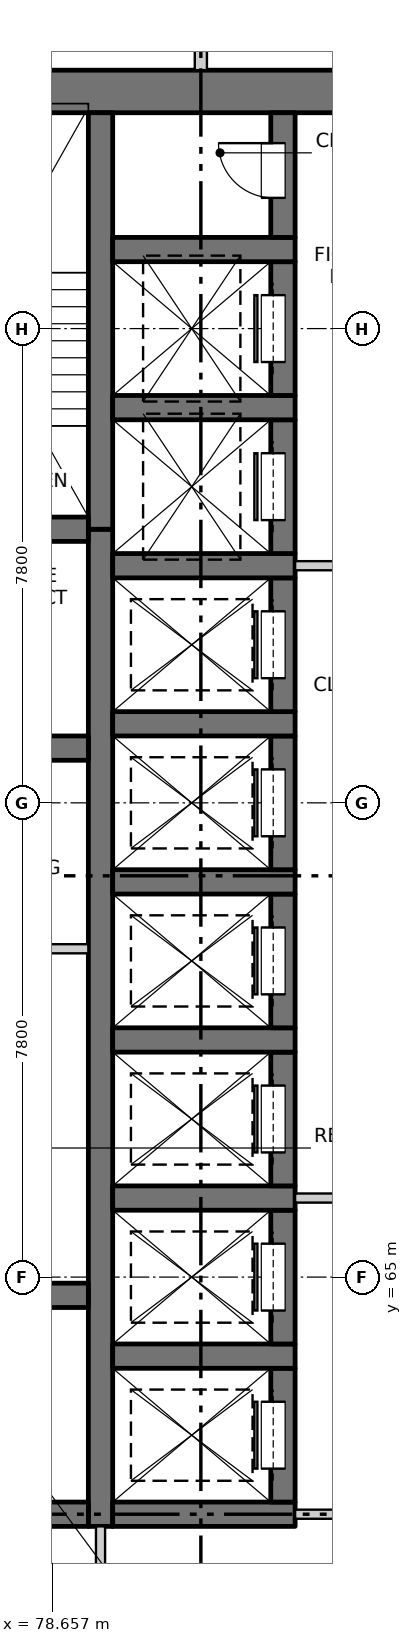
"""IFC4 building model, lengths in metres.
Left out: names, types, materials, properties, quantities, classifications, styles, units other than length and angle.
Written with IfcOpenShell. Run it as: python <this file> out.ifc"""

import sys

from ifc_helpers import new_model, si_unit, direction, frame, frame_2d, origin, place, context, subcontext, project, spatial, rectangle, extrude, element, fill, save


model = new_model("IFC4")
c1 = context("Model", 3, precision=1e-05, world=origin(), true_north=direction((0.0, 1.0)))
c2 = subcontext(c1, "Body", "Model", "MODEL_VIEW")
j1 = project(units=[si_unit("LENGTHUNIT", "METRE"), si_unit("PLANEANGLEUNIT", "RADIAN")], contexts=[c1])
p1 = place(None, origin())
s1 = spatial("IfcSite", under=j1, at=p1, CompositionType="ELEMENT")
p2 = place(p1, origin())
s2 = spatial("IfcBuilding", under=s1, at=p2, CompositionType="ELEMENT")
p3 = place(p2, frame((0.0, 0.0, 39.9)))
s3 = spatial("IfcBuildingStorey", under=s2, at=p3, CompositionType="ELEMENT", Elevation=39.9)
p4 = place(p3, frame((75.6, 84.5, -0.25), z_axis=(0.0, 0.0, 1.0), x_axis=(1.0, 0.0, 0.0)))
e1 = element("IfcWall", 1, at=p4, inside=s3, PredefinedType="SOLIDWALL", context=c2, shape_type="SweptSolid", body=[
    extrude(rectangle(XDim=18.8, YDim=0.7, at=frame_2d((9.4, 0.0))), origin(), (0.0, 0.0, 1.0), 3.4),
])
p5 = place(p3, frame((79.45, 60.9, -0.25), z_axis=(0.0, 0.0, 1.0), x_axis=(0.0, 1.0, 0.0)))
e2 = element("IfcWall", 2, at=p5, inside=s3, PredefinedType="SOLIDWALL", context=c2, shape_type="SweptSolid", body=[
    extrude(rectangle(XDim=16.4, YDim=0.4, at=frame_2d((8.2, 0.0))), origin(), (0.0, 0.0, 1.0), 3.4),
])
p6 = place(p3, frame((79.45, 77.3, -0.25), z_axis=(0.0, 0.0, 1.0), x_axis=(0.0, 1.0, 0.0)))
e3 = element("IfcWall", 3, at=p6, inside=s3, PredefinedType="SOLIDWALL", context=c2, shape_type="SweptSolid", body=[
    extrude(rectangle(XDim=6.85, YDim=0.4, at=frame_2d((3.425, 0.0))), origin(), (0.0, 0.0, 1.0), 3.4),
])
p7 = place(p3, frame((79.65, 61.1, -0.25), z_axis=(0.0, 0.0, 1.0), x_axis=(1.0, 0.0, 0.0)))
e4 = element("IfcWall", 4, at=p7, inside=s3, PredefinedType="SOLIDWALL", context=c2, shape_type="SweptSolid", body=[
    extrude(rectangle(XDim=3.0, YDim=0.4, at=frame_2d((1.5, 0.0))), origin(), (0.0, 0.0, 1.0), 3.4),
])
p8 = place(p3, frame((82.45, 61.3, -0.25), z_axis=(0.0, 0.0, 1.0), x_axis=(0.0, 1.0, 0.0)))
e5 = element("IfcWall", 5, at=p8, inside=s3, PredefinedType="SOLIDWALL", context=c2, shape_type="SweptSolid", body=[
    extrude(rectangle(XDim=2.2, YDim=0.4, at=frame_2d((1.1, 0.0))), origin(), (0.0, 0.0, 1.0), 3.4),
])
p9 = place(p8, frame((0.55, 0.0, 0.25)))
e6 = element("IfcOpeningElement", 6, at=p9, cuts=e5, PredefinedType="OPENING", context=c2, shape_type="SweptSolid", body=[
    extrude(rectangle(XDim=1.1, YDim=2.1, at=frame_2d((0.55, 1.05))), frame((0.0, 0.21, 0.0), z_axis=(0.0, -1.0, 0.0), x_axis=(1.0, 0.0, 0.0)), (0.0, 0.0, 1.0), 0.42),
])
p10 = place(p3, frame((79.65, 63.7, -0.25), z_axis=(0.0, 0.0, 1.0), x_axis=(1.0, 0.0, 0.0)))
e7 = element("IfcWall", 7, at=p10, inside=s3, PredefinedType="SOLIDWALL", context=c2, shape_type="SweptSolid", body=[
    extrude(rectangle(XDim=3.0, YDim=0.4, at=frame_2d((1.5, 0.0))), origin(), (0.0, 0.0, 1.0), 3.4),
])
p11 = place(p3, frame((82.45, 63.9, -0.25), z_axis=(0.0, 0.0, 1.0), x_axis=(0.0, 1.0, 0.0)))
e8 = element("IfcWall", 8, at=p11, inside=s3, PredefinedType="SOLIDWALL", context=c2, shape_type="SweptSolid", body=[
    extrude(rectangle(XDim=2.2, YDim=0.4, at=frame_2d((1.1, 0.0))), origin(), (0.0, 0.0, 1.0), 3.4),
])
p12 = place(p11, frame((0.55, 0.0, 0.25)))
e9 = element("IfcOpeningElement", 9, at=p12, cuts=e8, PredefinedType="OPENING", context=c2, shape_type="SweptSolid", body=[
    extrude(rectangle(XDim=1.1, YDim=2.1, at=frame_2d((0.55, 1.05))), frame((0.0, 0.21, 0.0), z_axis=(0.0, -1.0, 0.0), x_axis=(1.0, 0.0, 0.0)), (0.0, 0.0, 1.0), 0.42),
])
p13 = place(p3, frame((79.65, 66.3, -0.25), z_axis=(0.0, 0.0, 1.0), x_axis=(1.0, 0.0, 0.0)))
e10 = element("IfcWall", 10, at=p13, inside=s3, PredefinedType="SOLIDWALL", context=c2, shape_type="SweptSolid", body=[
    extrude(rectangle(XDim=3.0, YDim=0.4, at=frame_2d((1.5, 0.0))), origin(), (0.0, 0.0, 1.0), 3.4),
])
p14 = place(p3, frame((82.45, 66.5, -0.25), z_axis=(0.0, 0.0, 1.0), x_axis=(0.0, 1.0, 0.0)))
e11 = element("IfcWall", 11, at=p14, inside=s3, PredefinedType="SOLIDWALL", context=c2, shape_type="SweptSolid", body=[
    extrude(rectangle(XDim=2.2, YDim=0.4, at=frame_2d((1.1, 0.0))), origin(), (0.0, 0.0, 1.0), 3.4),
])
p15 = place(p14, frame((0.55, 0.0, 0.25)))
e12 = element("IfcOpeningElement", 12, at=p15, cuts=e11, PredefinedType="OPENING", context=c2, shape_type="SweptSolid", body=[
    extrude(rectangle(XDim=1.1, YDim=2.1, at=frame_2d((0.55, 1.05))), frame((0.0, 0.21, 0.0), z_axis=(0.0, -1.0, 0.0), x_axis=(1.0, 0.0, 0.0)), (0.0, 0.0, 1.0), 0.42),
])
p16 = place(p3, frame((79.65, 68.9, -0.25), z_axis=(0.0, 0.0, 1.0), x_axis=(1.0, 0.0, 0.0)))
e13 = element("IfcWall", 13, at=p16, inside=s3, PredefinedType="SOLIDWALL", context=c2, shape_type="SweptSolid", body=[
    extrude(rectangle(XDim=3.0, YDim=0.4, at=frame_2d((1.5, 0.0))), origin(), (0.0, 0.0, 1.0), 3.4),
])
p17 = place(p3, frame((82.45, 69.1, -0.25), z_axis=(0.0, 0.0, 1.0), x_axis=(0.0, 1.0, 0.0)))
e14 = element("IfcWall", 14, at=p17, inside=s3, PredefinedType="SOLIDWALL", context=c2, shape_type="SweptSolid", body=[
    extrude(rectangle(XDim=2.2, YDim=0.4, at=frame_2d((1.1, 0.0))), origin(), (0.0, 0.0, 1.0), 3.4),
])
p18 = place(p17, frame((0.55, 0.0, 0.25)))
e15 = element("IfcOpeningElement", 15, at=p18, cuts=e14, PredefinedType="OPENING", context=c2, shape_type="SweptSolid", body=[
    extrude(rectangle(XDim=1.1, YDim=2.1, at=frame_2d((0.55, 1.05))), frame((0.0, 0.21, 0.0), z_axis=(0.0, -1.0, 0.0), x_axis=(1.0, 0.0, 0.0)), (0.0, 0.0, 1.0), 0.42),
])
p19 = place(p3, frame((79.65, 71.5, -0.25), z_axis=(0.0, 0.0, 1.0), x_axis=(1.0, 0.0, 0.0)))
e16 = element("IfcWall", 16, at=p19, inside=s3, PredefinedType="SOLIDWALL", context=c2, shape_type="SweptSolid", body=[
    extrude(rectangle(XDim=3.0, YDim=0.4, at=frame_2d((1.5, 0.0))), origin(), (0.0, 0.0, 1.0), 3.4),
])
p20 = place(p3, frame((82.45, 71.7, -0.25), z_axis=(0.0, 0.0, 1.0), x_axis=(0.0, 1.0, 0.0)))
e17 = element("IfcWall", 17, at=p20, inside=s3, PredefinedType="SOLIDWALL", context=c2, shape_type="SweptSolid", body=[
    extrude(rectangle(XDim=2.2, YDim=0.4, at=frame_2d((1.1, 0.0))), origin(), (0.0, 0.0, 1.0), 3.4),
])
p21 = place(p20, frame((0.55, 0.0, 0.25)))
e18 = element("IfcOpeningElement", 18, at=p21, cuts=e17, PredefinedType="OPENING", context=c2, shape_type="SweptSolid", body=[
    extrude(rectangle(XDim=1.1, YDim=2.1, at=frame_2d((0.55, 1.05))), frame((0.0, 0.21, 0.0), z_axis=(0.0, -1.0, 0.0), x_axis=(1.0, 0.0, 0.0)), (0.0, 0.0, 1.0), 0.42),
])
p22 = place(p3, frame((79.65, 74.1, -0.25), z_axis=(0.0, 0.0, 1.0), x_axis=(1.0, 0.0, 0.0)))
e19 = element("IfcWall", 19, at=p22, inside=s3, PredefinedType="SOLIDWALL", context=c2, shape_type="SweptSolid", body=[
    extrude(rectangle(XDim=3.0, YDim=0.4, at=frame_2d((1.5, 0.0))), origin(), (0.0, 0.0, 1.0), 3.4),
])
p23 = place(p3, frame((82.45, 74.3, -0.25), z_axis=(0.0, 0.0, 1.0), x_axis=(0.0, 1.0, 0.0)))
e20 = element("IfcWall", 20, at=p23, inside=s3, PredefinedType="SOLIDWALL", context=c2, shape_type="SweptSolid", body=[
    extrude(rectangle(XDim=2.2, YDim=0.4, at=frame_2d((1.1, 0.0))), origin(), (0.0, 0.0, 1.0), 3.4),
])
p24 = place(p23, frame((0.55, 0.0, 0.25)))
e21 = element("IfcOpeningElement", 21, at=p24, cuts=e20, PredefinedType="OPENING", context=c2, shape_type="SweptSolid", body=[
    extrude(rectangle(XDim=1.1, YDim=2.1, at=frame_2d((0.55, 1.05))), frame((0.0, 0.21, 0.0), z_axis=(0.0, -1.0, 0.0), x_axis=(1.0, 0.0, 0.0)), (0.0, 0.0, 1.0), 0.42),
])
p25 = place(p3, frame((79.65, 76.7, -0.25), z_axis=(0.0, 0.0, 1.0), x_axis=(1.0, 0.0, 0.0)))
e22 = element("IfcWall", 22, at=p25, inside=s3, PredefinedType="SOLIDWALL", context=c2, shape_type="SweptSolid", body=[
    extrude(rectangle(XDim=3.0, YDim=0.4, at=frame_2d((1.5, 0.0))), origin(), (0.0, 0.0, 1.0), 3.4),
])
p26 = place(p3, frame((82.45, 76.9, -0.25), z_axis=(0.0, 0.0, 1.0), x_axis=(0.0, 1.0, 0.0)))
e23 = element("IfcWall", 23, at=p26, inside=s3, PredefinedType="SOLIDWALL", context=c2, shape_type="SweptSolid", body=[
    extrude(rectangle(XDim=2.2, YDim=0.4, at=frame_2d((1.1, 0.0))), origin(), (0.0, 0.0, 1.0), 3.4),
])
p27 = place(p26, frame((0.55, 0.0, 0.25)))
e24 = element("IfcOpeningElement", 24, at=p27, cuts=e23, PredefinedType="OPENING", context=c2, shape_type="SweptSolid", body=[
    extrude(rectangle(XDim=1.1, YDim=2.1, at=frame_2d((0.55, 1.05))), frame((0.0, 0.21, 0.0), z_axis=(0.0, -1.0, 0.0), x_axis=(1.0, 0.0, 0.0)), (0.0, 0.0, 1.0), 0.42),
])
p28 = place(p3, frame((79.65, 79.3, -0.25), z_axis=(0.0, 0.0, 1.0), x_axis=(1.0, 0.0, 0.0)))
e25 = element("IfcWall", 25, at=p28, inside=s3, PredefinedType="SOLIDWALL", context=c2, shape_type="SweptSolid", body=[
    extrude(rectangle(XDim=3.0, YDim=0.4, at=frame_2d((1.5, 0.0))), origin(), (0.0, 0.0, 1.0), 3.4),
])
p29 = place(p3, frame((82.45, 79.5, -0.25), z_axis=(0.0, 0.0, 1.0), x_axis=(0.0, 1.0, 0.0)))
e26 = element("IfcWall", 26, at=p29, inside=s3, PredefinedType="SOLIDWALL", context=c2, shape_type="SweptSolid", body=[
    extrude(rectangle(XDim=2.2, YDim=0.4, at=frame_2d((1.1, 0.0))), origin(), (0.0, 0.0, 1.0), 3.4),
])
p30 = place(p29, frame((0.55, 0.0, 0.25)))
e27 = element("IfcOpeningElement", 27, at=p30, cuts=e26, PredefinedType="OPENING", context=c2, shape_type="SweptSolid", body=[
    extrude(rectangle(XDim=1.1, YDim=2.1, at=frame_2d((0.55, 1.05))), frame((0.0, 0.21, 0.0), z_axis=(0.0, -1.0, 0.0), x_axis=(1.0, 0.0, 0.0)), (0.0, 0.0, 1.0), 0.42),
])
p31 = place(p3, frame((79.65, 81.9, -0.25), z_axis=(0.0, 0.0, 1.0), x_axis=(1.0, 0.0, 0.0)))
e28 = element("IfcWall", 28, at=p31, inside=s3, PredefinedType="SOLIDWALL", context=c2, shape_type="SweptSolid", body=[
    extrude(rectangle(XDim=3.0, YDim=0.4, at=frame_2d((1.5, 0.0))), origin(), (0.0, 0.0, 1.0), 3.4),
])
p32 = place(p3, frame((82.45, 82.1, -0.25), z_axis=(0.0, 0.0, 1.0), x_axis=(0.0, 1.0, 0.0)))
e29 = element("IfcWall", 29, at=p32, inside=s3, PredefinedType="SOLIDWALL", context=c2, shape_type="SweptSolid", body=[
    extrude(rectangle(XDim=2.05, YDim=0.4, at=frame_2d((1.025, 0.0))), origin(), (0.0, 0.0, 1.0), 3.4),
])
p33 = place(p32, frame((0.65, 0.0, 0.25)))
e30 = element("IfcOpeningElement", 30, at=p33, cuts=e29, PredefinedType="OPENING", context=c2, shape_type="SweptSolid", body=[
    extrude(rectangle(XDim=0.9, YDim=2.1, at=frame_2d((0.45, 1.05))), frame((0.0, 0.21, 0.0), z_axis=(0.0, -1.0, 0.0), x_axis=(1.0, 0.0, 0.0)), (0.0, 0.0, 1.0), 0.42),
])
for number, where, z_axis, x_axis in (
    (31, (75.6, 61.1, -0.25), (0.0, 0.0, 1.0), (1.0, 0.0, 0.0)),
    (32, (75.6, 64.7, -0.25), (0.0, 0.0, 1.0), (1.0, 0.0, 0.0)),
    (33, (75.6, 73.7, -0.25), (0.0, 0.0, 1.0), (1.0, 0.0, 0.0)),
    (34, (75.6, 77.3, -0.25), (0.0, 0.0, 1.0), (1.0, 0.0, 0.0)),
):
    element("IfcWall", number, at=place(p3, frame(where, z_axis=z_axis, x_axis=x_axis)), inside=s3, PredefinedType="SOLIDWALL", context=c2, shape_type="SweptSolid", body=[
        extrude(rectangle(XDim=3.65, YDim=0.4, at=frame_2d((1.825, 0.0))), origin(), (0.0, 0.0, 1.0), 3.4),
    ])
p34 = place(p3, frame((82.65, 61.1, 0.0), z_axis=(0.0, 0.0, 1.0), x_axis=(1.0, 0.0, 0.0)))
e35 = element("IfcWall", 35, at=p34, inside=s3, PredefinedType="PARTITIONING", context=c2, shape_type="SweptSolid", body=[
    extrude(rectangle(XDim=4.7, YDim=0.15, at=frame_2d((2.35, 0.0))), origin(), (0.0, 0.0, 1.0), 3.15),
])
p35 = place(p34, frame((1.45, 0.0, 0.0)))
e36 = element("IfcOpeningElement", 36, at=p35, cuts=e35, PredefinedType="OPENING", context=c2, shape_type="SweptSolid", body=[
    extrude(rectangle(XDim=1.8, YDim=2.1, at=frame_2d((0.9, 1.05))), frame((0.0, 0.085, 0.0), z_axis=(0.0, -1.0, 0.0), x_axis=(1.0, 0.0, 0.0)), (0.0, 0.0, 1.0), 0.17),
])
p36 = place(p3, frame((82.65, 66.3, 0.0), z_axis=(0.0, 0.0, 1.0), x_axis=(1.0, 0.0, 0.0)))
e37 = element("IfcWall", 37, at=p36, inside=s3, PredefinedType="PARTITIONING", context=c2, shape_type="SweptSolid", body=[
    extrude(rectangle(XDim=4.7, YDim=0.15, at=frame_2d((2.35, 0.0))), origin(), (0.0, 0.0, 1.0), 3.15),
])
p37 = place(p36, frame((1.45, 0.0, 0.0)))
e38 = element("IfcOpeningElement", 38, at=p37, cuts=e37, PredefinedType="OPENING", context=c2, shape_type="SweptSolid", body=[
    extrude(rectangle(XDim=1.8, YDim=2.1, at=frame_2d((0.9, 1.05))), frame((0.0, 0.085, 0.0), z_axis=(0.0, -1.0, 0.0), x_axis=(1.0, 0.0, 0.0)), (0.0, 0.0, 1.0), 0.17),
])
p38 = place(p3, frame((75.6, 70.4, 0.0), z_axis=(0.0, 0.0, 1.0), x_axis=(1.0, 0.0, 0.0)))
e39 = element("IfcWall", 39, at=p38, inside=s3, PredefinedType="PARTITIONING", context=c2, shape_type="SweptSolid", body=[
    extrude(rectangle(XDim=3.65, YDim=0.15, at=frame_2d((1.825, 0.0))), origin(), (0.0, 0.0, 1.0), 3.15),
])
p39 = place(p3, frame((82.65, 76.7, 0.0), z_axis=(0.0, 0.0, 1.0), x_axis=(1.0, 0.0, 0.0)))
e40 = element("IfcWall", 40, at=p39, inside=s3, PredefinedType="PARTITIONING", context=c2, shape_type="SweptSolid", body=[
    extrude(rectangle(XDim=4.7, YDim=0.15, at=frame_2d((2.35, 0.0))), origin(), (0.0, 0.0, 1.0), 3.15),
])
p40 = place(p39, frame((1.45, 0.0, 0.0)))
e41 = element("IfcOpeningElement", 41, at=p40, cuts=e40, PredefinedType="OPENING", context=c2, shape_type="SweptSolid", body=[
    extrude(rectangle(XDim=1.8, YDim=2.1, at=frame_2d((0.9, 1.05))), frame((0.0, 0.085, 0.0), z_axis=(0.0, -1.0, 0.0), x_axis=(1.0, 0.0, 0.0)), (0.0, 0.0, 1.0), 0.17),
])
p41 = place(p3, frame((79.45, 55.6, 0.0), z_axis=(0.0, 0.0, 1.0), x_axis=(0.0, 1.0, 0.0)))
e42 = element("IfcWall", 42, at=p41, inside=s3, PredefinedType="PARTITIONING", context=c2, shape_type="SweptSolid", body=[
    extrude(rectangle(XDim=5.3, YDim=0.15, at=frame_2d((2.65, 0.0))), origin(), (0.0, 0.0, 1.0), 3.15),
])
p42 = place(p41, frame((2.1, 0.0, 0.0)))
e43 = element("IfcOpeningElement", 43, at=p42, cuts=e42, PredefinedType="OPENING", context=c2, shape_type="SweptSolid", body=[
    extrude(rectangle(XDim=0.9, YDim=2.1, at=frame_2d((0.45, 1.05))), frame((0.0, 0.085, 0.0), z_axis=(0.0, -1.0, 0.0), x_axis=(1.0, 0.0, 0.0)), (0.0, 0.0, 1.0), 0.17),
])
p43 = place(p3, frame((81.1, 84.85, 0.0), z_axis=(0.0, 0.0, 1.0), x_axis=(0.0, 1.0, 0.0)))
e44 = element("IfcWall", 44, at=p43, inside=s3, PredefinedType="PARTITIONING", context=c2, shape_type="SweptSolid", body=[
    extrude(rectangle(XDim=3.25, YDim=0.2, at=frame_2d((1.625, 0.0))), origin(), (0.0, 0.0, 1.0), 3.15),
])
p44 = place(p9, origin())
e45 = element("IfcDoor", 45, at=p44, inside=s3, OperationType="SLIDING_TO_RIGHT", PredefinedType="DOOR", context=c2, shape_type="SweptSolid", body=[
    extrude(rectangle(XDim=1.1, YDim=2.1, at=frame_2d((0.55, 1.05))), frame((0.0, 0.185, 0.0), z_axis=(0.0, -1.0, 0.0), x_axis=(1.0, 0.0, 0.0)), (0.0, 0.0, 1.0), 0.05),
])
fill(e6, e45)
p45 = place(p12, origin())
e46 = element("IfcDoor", 46, at=p45, inside=s3, OperationType="SLIDING_TO_RIGHT", PredefinedType="DOOR", context=c2, shape_type="SweptSolid", body=[
    extrude(rectangle(XDim=1.1, YDim=2.1, at=frame_2d((0.55, 1.05))), frame((0.0, 0.185, 0.0), z_axis=(0.0, -1.0, 0.0), x_axis=(1.0, 0.0, 0.0)), (0.0, 0.0, 1.0), 0.05),
])
fill(e9, e46)
p46 = place(p15, origin())
e47 = element("IfcDoor", 47, at=p46, inside=s3, OperationType="SLIDING_TO_RIGHT", PredefinedType="DOOR", context=c2, shape_type="SweptSolid", body=[
    extrude(rectangle(XDim=1.1, YDim=2.1, at=frame_2d((0.55, 1.05))), frame((0.0, 0.185, 0.0), z_axis=(0.0, -1.0, 0.0), x_axis=(1.0, 0.0, 0.0)), (0.0, 0.0, 1.0), 0.05),
])
fill(e12, e47)
p47 = place(p18, origin())
e48 = element("IfcDoor", 48, at=p47, inside=s3, OperationType="SLIDING_TO_LEFT", PredefinedType="DOOR", context=c2, shape_type="SweptSolid", body=[
    extrude(rectangle(XDim=1.1, YDim=2.1, at=frame_2d((0.55, 1.05))), frame((0.0, 0.185, 0.0), z_axis=(0.0, -1.0, 0.0), x_axis=(1.0, 0.0, 0.0)), (0.0, 0.0, 1.0), 0.05),
])
fill(e15, e48)
p48 = place(p21, origin())
e49 = element("IfcDoor", 49, at=p48, inside=s3, OperationType="SLIDING_TO_LEFT", PredefinedType="DOOR", context=c2, shape_type="SweptSolid", body=[
    extrude(rectangle(XDim=1.1, YDim=2.1, at=frame_2d((0.55, 1.05))), frame((0.0, 0.185, 0.0), z_axis=(0.0, -1.0, 0.0), x_axis=(1.0, 0.0, 0.0)), (0.0, 0.0, 1.0), 0.05),
])
fill(e18, e49)
p49 = place(p24, origin())
e50 = element("IfcDoor", 50, at=p49, inside=s3, OperationType="SLIDING_TO_LEFT", PredefinedType="DOOR", context=c2, shape_type="SweptSolid", body=[
    extrude(rectangle(XDim=1.1, YDim=2.1, at=frame_2d((0.55, 1.05))), frame((0.0, 0.185, 0.0), z_axis=(0.0, -1.0, 0.0), x_axis=(1.0, 0.0, 0.0)), (0.0, 0.0, 1.0), 0.05),
])
fill(e21, e50)
p50 = place(p27, origin())
e51 = element("IfcDoor", 51, at=p50, inside=s3, OperationType="SLIDING_TO_LEFT", PredefinedType="DOOR", context=c2, shape_type="SweptSolid", body=[
    extrude(rectangle(XDim=1.1, YDim=2.1, at=frame_2d((0.55, 1.05))), frame((0.0, 0.185, 0.0), z_axis=(0.0, -1.0, 0.0), x_axis=(1.0, 0.0, 0.0)), (0.0, 0.0, 1.0), 0.05),
])
fill(e24, e51)
p51 = place(p30, origin())
e52 = element("IfcDoor", 52, at=p51, inside=s3, OperationType="SLIDING_TO_LEFT", PredefinedType="DOOR", context=c2, shape_type="SweptSolid", body=[
    extrude(rectangle(XDim=1.1, YDim=2.1, at=frame_2d((0.55, 1.05))), frame((0.0, 0.185, 0.0), z_axis=(0.0, -1.0, 0.0), x_axis=(1.0, 0.0, 0.0)), (0.0, 0.0, 1.0), 0.05),
])
fill(e27, e52)
p52 = place(p33, origin())
e53 = element("IfcDoor", 53, at=p52, inside=s3, OperationType="SINGLE_SWING_RIGHT", PredefinedType="DOOR", context=c2, shape_type="SweptSolid", body=[
    extrude(rectangle(XDim=0.9, YDim=2.1, at=frame_2d((0.45, 1.05))), frame((0.0, 0.185, 0.0), z_axis=(0.0, -1.0, 0.0), x_axis=(1.0, 0.0, 0.0)), (0.0, 0.0, 1.0), 0.05),
])
fill(e30, e53)
save(model, sys.argv[1])
